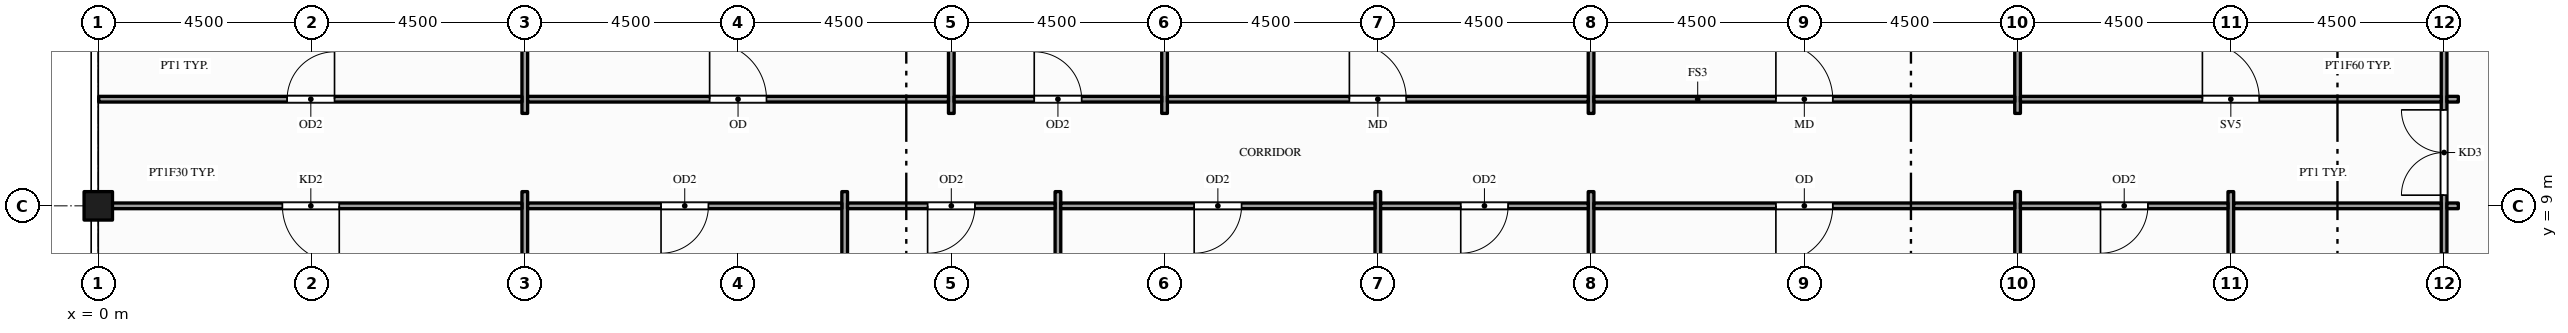
"""IFC4 building model, lengths in metres.
Left out: names, types, materials, properties, quantities, classifications, styles, units other than length and angle.
Written with IfcOpenShell. Run it as: python <this file> out.ifc"""

import sys

from ifc_helpers import new_model, si_unit, direction, frame, frame_2d, origin, origin_2d, place, context, subcontext, project, spatial, rectangle, hollow_rectangle, extrude, element, fill, save


model = new_model("IFC4")
c1 = context("Model", 3, precision=1e-05, world=origin(), true_north=direction((0.0, 1.0)))
c2 = subcontext(c1, "Body", "Model", "MODEL_VIEW")
j1 = project(units=[si_unit("LENGTHUNIT", "METRE"), si_unit("PLANEANGLEUNIT", "RADIAN")], contexts=[c1])
p1 = place(None, origin())
s1 = spatial("IfcSite", under=j1, at=p1, CompositionType="ELEMENT")
p2 = place(p1, origin())
s2 = spatial("IfcBuilding", under=s1, at=p2, CompositionType="ELEMENT")
p3 = place(p2, frame((0.0, 0.0, 332.0)))
s3 = spatial("IfcBuildingStorey", under=s2, at=p3, CompositionType="ELEMENT", Elevation=332.0)
p4 = place(p3, frame((0.0, 9.0, -0.15), z_axis=(0.0, 0.0, 1.0), x_axis=(1.0, 0.0, 0.0)))
e1 = element("IfcColumn", 1, at=p4, inside=s3, PredefinedType="COLUMN", context=c2, shape_type="SweptSolid", body=[
    extrude(hollow_rectangle(XDim=0.6, YDim=0.6, WallThickness=0.03, at=origin_2d()), origin(), (0.0, 0.0, 1.0), 4.5),
])
p5 = place(p3, frame((9.0, 3.875, 0.0), z_axis=(0.0, 0.0, 1.0), x_axis=(0.0, 1.0, 0.0)))
e2 = element("IfcWall", 2, at=p5, inside=s3, PredefinedType="PARTITIONING", context=c2, shape_type="SweptSolid", body=[
    extrude(rectangle(XDim=5.425, YDim=0.12, at=frame_2d((2.712, 0.0))), origin(), (0.0, 0.0, 1.0), 3.359),
])
p6 = place(p3, frame((9.0, 10.95, 0.0), z_axis=(0.0, 0.0, 1.0), x_axis=(0.0, 1.0, 0.0)))
e3 = element("IfcWall", 3, at=p6, inside=s3, PredefinedType="PARTITIONING", context=c2, shape_type="SweptSolid", body=[
    extrude(rectangle(XDim=11.54, YDim=0.12, at=frame_2d((5.77, 0.0))), origin(), (0.0, 0.0, 1.0), 3.359),
])
p7 = place(p3, frame((15.75, 0.01, 0.0), z_axis=(0.0, 0.0, 1.0), x_axis=(0.0, 1.0, 0.0)))
e4 = element("IfcWall", 4, at=p7, inside=s3, PredefinedType="PARTITIONING", context=c2, shape_type="SweptSolid", body=[
    extrude(rectangle(XDim=9.29, YDim=0.12, at=frame_2d((4.645, 0.0))), origin(), (0.0, 0.0, 1.0), 3.359),
])
p8 = place(p3, frame((18.0, 10.95, 0.0), z_axis=(0.0, 0.0, 1.0), x_axis=(0.0, 1.0, 0.0)))
e5 = element("IfcWall", 5, at=p8, inside=s3, PredefinedType="PARTITIONING", context=c2, shape_type="SweptSolid", body=[
    extrude(rectangle(XDim=11.54, YDim=0.12, at=frame_2d((5.77, 0.0))), origin(), (0.0, 0.0, 1.0), 3.359),
])
p9 = place(p3, frame((20.25, 0.01, 0.0), z_axis=(0.0, 0.0, 1.0), x_axis=(0.0, 1.0, 0.0)))
e6 = element("IfcWall", 6, at=p9, inside=s3, PredefinedType="PARTITIONING", context=c2, shape_type="SweptSolid", body=[
    extrude(rectangle(XDim=9.29, YDim=0.12, at=frame_2d((4.645, 0.0))), origin(), (0.0, 0.0, 1.0), 3.359),
])
p10 = place(p3, frame((22.5, 10.95, 0.0), z_axis=(0.0, 0.0, 1.0), x_axis=(0.0, 1.0, 0.0)))
e7 = element("IfcWall", 7, at=p10, inside=s3, PredefinedType="PARTITIONING", context=c2, shape_type="SweptSolid", body=[
    extrude(rectangle(XDim=11.54, YDim=0.12, at=frame_2d((5.77, 0.0))), origin(), (0.0, 0.0, 1.0), 3.359),
])
for number, where, z_axis, x_axis in (
    (8, (27.0, 0.01, 0.0), (0.0, 0.0, 1.0), (0.0, 1.0, 0.0)),
    (9, (31.5, 0.01, 0.0), (0.0, 0.0, 1.0), (0.0, 1.0, 0.0)),
):
    element("IfcWall", number, at=place(p3, frame(where, z_axis=z_axis, x_axis=x_axis)), inside=s3, PredefinedType="PARTITIONING", context=c2, shape_type="SweptSolid", body=[
        extrude(rectangle(XDim=9.29, YDim=0.12, at=frame_2d((4.645, 0.0))), origin(), (0.0, 0.0, 1.0), 3.359),
    ])
p11 = place(p3, frame((31.5, 10.95, 0.0), z_axis=(0.0, 0.0, 1.0), x_axis=(0.0, 1.0, 0.0)))
e10 = element("IfcWall", 10, at=p11, inside=s3, PredefinedType="PARTITIONING", context=c2, shape_type="SweptSolid", body=[
    extrude(rectangle(XDim=11.54, YDim=0.12, at=frame_2d((5.77, 0.0))), origin(), (0.0, 0.0, 1.0), 3.359),
])
p12 = place(p3, frame((40.5, 0.01, 0.0), z_axis=(0.0, 0.0, 1.0), x_axis=(0.0, 1.0, 0.0)))
e11 = element("IfcWall", 11, at=p12, inside=s3, PredefinedType="PARTITIONING", context=c2, shape_type="SweptSolid", body=[
    extrude(rectangle(XDim=9.29, YDim=0.12, at=frame_2d((4.645, 0.0))), origin(), (0.0, 0.0, 1.0), 3.359),
])
p13 = place(p3, frame((40.5, 10.95, 0.0), z_axis=(0.0, 0.0, 1.0), x_axis=(0.0, 1.0, 0.0)))
e12 = element("IfcWall", 12, at=p13, inside=s3, PredefinedType="PARTITIONING", context=c2, shape_type="SweptSolid", body=[
    extrude(rectangle(XDim=11.54, YDim=0.12, at=frame_2d((5.77, 0.0))), origin(), (0.0, 0.0, 1.0), 3.359),
])
p14 = place(p3, frame((45.0, 0.01, 0.0), z_axis=(0.0, 0.0, 1.0), x_axis=(0.0, 1.0, 0.0)))
e13 = element("IfcWall", 13, at=p14, inside=s3, PredefinedType="PARTITIONING", context=c2, shape_type="SweptSolid", body=[
    extrude(rectangle(XDim=9.29, YDim=0.12, at=frame_2d((4.645, 0.0))), origin(), (0.0, 0.0, 1.0), 3.359),
])
p15 = place(p3, frame((49.5, 0.01, 0.0), z_axis=(0.0, 0.0, 1.0), x_axis=(0.0, 1.0, 0.0)))
e14 = element("IfcWall", 14, at=p15, inside=s3, PredefinedType="PARTITIONING", context=c2, shape_type="SweptSolid", body=[
    extrude(rectangle(XDim=22.48, YDim=0.12, at=frame_2d((11.24, 0.0))), origin(), (0.0, 0.0, 1.0), 3.359),
])
p16 = place(p15, frame((9.215, 0.0, 0.0)))
e15 = element("IfcOpeningElement", 15, at=p16, cuts=e14, PredefinedType="OPENING", context=c2, shape_type="SweptSolid", body=[
    extrude(rectangle(XDim=1.8, YDim=2.1, at=frame_2d((0.9, 1.05))), frame((0.0, 0.07, 0.0), z_axis=(0.0, -1.0, 0.0), x_axis=(1.0, 0.0, 0.0)), (0.0, 0.0, 1.0), 0.14),
])
p17 = place(p15, frame((0.99, 0.0, 0.0)))
e16 = element("IfcOpeningElement", 16, at=p17, cuts=e14, PredefinedType="OPENING", context=c2, shape_type="SweptSolid", body=[
    extrude(rectangle(XDim=0.9, YDim=2.1, at=frame_2d((0.45, 1.05))), frame((0.0, 0.07, 0.0), z_axis=(0.0, -1.0, 0.0), x_axis=(1.0, 0.0, 0.0)), (0.0, 0.0, 1.0), 0.14),
])
p18 = place(p15, frame((4.04, 0.0, 0.0)))
e17 = element("IfcOpeningElement", 17, at=p18, cuts=e14, PredefinedType="OPENING", context=c2, shape_type="SweptSolid", body=[
    extrude(rectangle(XDim=0.9, YDim=2.1, at=frame_2d((0.45, 1.05))), frame((0.0, 0.07, 0.0), z_axis=(0.0, -1.0, 0.0), x_axis=(1.0, 0.0, 0.0)), (0.0, 0.0, 1.0), 0.14),
])
p19 = place(p15, frame((6.99, 0.0, 0.0)))
e18 = element("IfcOpeningElement", 18, at=p19, cuts=e14, PredefinedType="OPENING", context=c2, shape_type="SweptSolid", body=[
    extrude(rectangle(XDim=1.0, YDim=2.1, at=frame_2d((0.5, 1.05))), frame((0.0, 0.07, 0.0), z_axis=(0.0, -1.0, 0.0), x_axis=(1.0, 0.0, 0.0)), (0.0, 0.0, 1.0), 0.14),
])
p20 = place(p3, frame((0.01, 9.0, 0.0), z_axis=(0.0, 0.0, 1.0), x_axis=(1.0, 0.0, 0.0)))
e19 = element("IfcWall", 19, at=p20, inside=s3, PredefinedType="PARTITIONING", context=c2, shape_type="SweptSolid", body=[
    extrude(rectangle(XDim=8.93, YDim=0.12, at=frame_2d((4.465, 0.0))), origin(), (0.0, 0.0, 1.0), 3.359),
])
p21 = place(p20, frame((3.875, 0.0, 0.0)))
e20 = element("IfcOpeningElement", 20, at=p21, cuts=e19, PredefinedType="OPENING", context=c2, shape_type="SweptSolid", body=[
    extrude(rectangle(XDim=1.2, YDim=2.1, at=frame_2d((0.6, 1.05))), frame((0.0, 0.07, 0.0), z_axis=(0.0, -1.0, 0.0), x_axis=(1.0, 0.0, 0.0)), (0.0, 0.0, 1.0), 0.14),
])
p22 = place(p3, frame((9.06, 9.0, 0.0), z_axis=(0.0, 0.0, 1.0), x_axis=(1.0, 0.0, 0.0)))
e21 = element("IfcWall", 21, at=p22, inside=s3, PredefinedType="PARTITIONING", context=c2, shape_type="SweptSolid", body=[
    extrude(rectangle(XDim=6.63, YDim=0.12, at=frame_2d((3.315, 0.0))), origin(), (0.0, 0.0, 1.0), 3.359),
])
p23 = place(p22, frame((2.815, 0.0, 0.0)))
e22 = element("IfcOpeningElement", 22, at=p23, cuts=e21, PredefinedType="OPENING", context=c2, shape_type="SweptSolid", body=[
    extrude(rectangle(XDim=1.0, YDim=2.1, at=frame_2d((0.5, 1.05))), frame((0.0, 0.07, 0.0), z_axis=(0.0, -1.0, 0.0), x_axis=(1.0, 0.0, 0.0)), (0.0, 0.0, 1.0), 0.14),
])
p24 = place(p3, frame((15.81, 9.0, 0.0), z_axis=(0.0, 0.0, 1.0), x_axis=(1.0, 0.0, 0.0)))
e23 = element("IfcWall", 23, at=p24, inside=s3, PredefinedType="PARTITIONING", context=c2, shape_type="SweptSolid", body=[
    extrude(rectangle(XDim=4.38, YDim=0.12, at=frame_2d((2.19, 0.0))), origin(), (0.0, 0.0, 1.0), 3.359),
])
p25 = place(p24, frame((1.69, 0.0, 0.0)))
e24 = element("IfcOpeningElement", 24, at=p25, cuts=e23, PredefinedType="OPENING", context=c2, shape_type="SweptSolid", body=[
    extrude(rectangle(XDim=1.0, YDim=2.1, at=frame_2d((0.5, 1.05))), frame((0.0, 0.07, 0.0), z_axis=(0.0, -1.0, 0.0), x_axis=(1.0, 0.0, 0.0)), (0.0, 0.0, 1.0), 0.14),
])
p26 = place(p3, frame((20.31, 9.0, 0.0), z_axis=(0.0, 0.0, 1.0), x_axis=(1.0, 0.0, 0.0)))
e25 = element("IfcWall", 25, at=p26, inside=s3, PredefinedType="PARTITIONING", context=c2, shape_type="SweptSolid", body=[
    extrude(rectangle(XDim=6.63, YDim=0.12, at=frame_2d((3.315, 0.0))), origin(), (0.0, 0.0, 1.0), 3.359),
])
p27 = place(p26, frame((2.815, 0.0, 0.0)))
e26 = element("IfcOpeningElement", 26, at=p27, cuts=e25, PredefinedType="OPENING", context=c2, shape_type="SweptSolid", body=[
    extrude(rectangle(XDim=1.0, YDim=2.1, at=frame_2d((0.5, 1.05))), frame((0.0, 0.07, 0.0), z_axis=(0.0, -1.0, 0.0), x_axis=(1.0, 0.0, 0.0)), (0.0, 0.0, 1.0), 0.14),
])
p28 = place(p3, frame((27.06, 9.0, 0.0), z_axis=(0.0, 0.0, 1.0), x_axis=(1.0, 0.0, 0.0)))
e27 = element("IfcWall", 27, at=p28, inside=s3, PredefinedType="PARTITIONING", context=c2, shape_type="SweptSolid", body=[
    extrude(rectangle(XDim=4.38, YDim=0.12, at=frame_2d((2.19, 0.0))), origin(), (0.0, 0.0, 1.0), 3.359),
])
p29 = place(p28, frame((1.69, 0.0, 0.0)))
e28 = element("IfcOpeningElement", 28, at=p29, cuts=e27, PredefinedType="OPENING", context=c2, shape_type="SweptSolid", body=[
    extrude(rectangle(XDim=1.0, YDim=2.1, at=frame_2d((0.5, 1.05))), frame((0.0, 0.07, 0.0), z_axis=(0.0, -1.0, 0.0), x_axis=(1.0, 0.0, 0.0)), (0.0, 0.0, 1.0), 0.14),
])
p30 = place(p3, frame((31.56, 9.0, 0.0), z_axis=(0.0, 0.0, 1.0), x_axis=(1.0, 0.0, 0.0)))
e29 = element("IfcWall", 29, at=p30, inside=s3, PredefinedType="PARTITIONING", context=c2, shape_type="SweptSolid", body=[
    extrude(rectangle(XDim=8.88, YDim=0.12, at=frame_2d((4.44, 0.0))), origin(), (0.0, 0.0, 1.0), 3.359),
])
p31 = place(p30, frame((3.84, 0.0, 0.0)))
e30 = element("IfcOpeningElement", 30, at=p31, cuts=e29, PredefinedType="OPENING", context=c2, shape_type="SweptSolid", body=[
    extrude(rectangle(XDim=1.2, YDim=2.1, at=frame_2d((0.6, 1.05))), frame((0.0, 0.07, 0.0), z_axis=(0.0, -1.0, 0.0), x_axis=(1.0, 0.0, 0.0)), (0.0, 0.0, 1.0), 0.14),
])
p32 = place(p3, frame((40.56, 9.0, 0.0), z_axis=(0.0, 0.0, 1.0), x_axis=(1.0, 0.0, 0.0)))
e31 = element("IfcWall", 31, at=p32, inside=s3, PredefinedType="PARTITIONING", context=c2, shape_type="SweptSolid", body=[
    extrude(rectangle(XDim=4.38, YDim=0.12, at=frame_2d((2.19, 0.0))), origin(), (0.0, 0.0, 1.0), 3.359),
])
p33 = place(p32, frame((1.69, 0.0, 0.0)))
e32 = element("IfcOpeningElement", 32, at=p33, cuts=e31, PredefinedType="OPENING", context=c2, shape_type="SweptSolid", body=[
    extrude(rectangle(XDim=1.0, YDim=2.1, at=frame_2d((0.5, 1.05))), frame((0.0, 0.07, 0.0), z_axis=(0.0, -1.0, 0.0), x_axis=(1.0, 0.0, 0.0)), (0.0, 0.0, 1.0), 0.14),
])
p34 = place(p3, frame((45.06, 9.0, 0.0), z_axis=(0.0, 0.0, 1.0), x_axis=(1.0, 0.0, 0.0)))
e33 = element("IfcWall", 33, at=p34, inside=s3, PredefinedType="PARTITIONING", context=c2, shape_type="SweptSolid", body=[
    extrude(rectangle(XDim=4.38, YDim=0.12, at=frame_2d((2.19, 0.0))), origin(), (0.0, 0.0, 1.0), 3.359),
])
p35 = place(p3, frame((49.56, 9.0, 0.0), z_axis=(0.0, 0.0, 1.0), x_axis=(1.0, 0.0, 0.0)))
e34 = element("IfcWall", 34, at=p35, inside=s3, PredefinedType="PARTITIONING", context=c2, shape_type="SweptSolid", body=[
    extrude(rectangle(XDim=0.24, YDim=0.12, at=frame_2d((0.12, 0.0))), origin(), (0.0, 0.0, 1.0), 3.359),
])
p36 = place(p3, frame((0.01, 11.25, 0.0), z_axis=(0.0, 0.0, 1.0), x_axis=(1.0, 0.0, 0.0)))
e35 = element("IfcWall", 35, at=p36, inside=s3, PredefinedType="PARTITIONING", context=c2, shape_type="SweptSolid", body=[
    extrude(rectangle(XDim=8.93, YDim=0.12, at=frame_2d((4.465, 0.0))), origin(), (0.0, 0.0, 1.0), 3.359),
])
p37 = place(p36, frame((3.975, 0.0, 0.0)))
e36 = element("IfcOpeningElement", 36, at=p37, cuts=e35, PredefinedType="OPENING", context=c2, shape_type="SweptSolid", body=[
    extrude(rectangle(XDim=1.0, YDim=2.1, at=frame_2d((0.5, 1.05))), frame((0.0, 0.07, 0.0), z_axis=(0.0, -1.0, 0.0), x_axis=(1.0, 0.0, 0.0)), (0.0, 0.0, 1.0), 0.14),
])
p38 = place(p3, frame((9.06, 11.25, 0.0), z_axis=(0.0, 0.0, 1.0), x_axis=(1.0, 0.0, 0.0)))
e37 = element("IfcWall", 37, at=p38, inside=s3, PredefinedType="PARTITIONING", context=c2, shape_type="SweptSolid", body=[
    extrude(rectangle(XDim=8.88, YDim=0.12, at=frame_2d((4.44, 0.0))), origin(), (0.0, 0.0, 1.0), 3.359),
])
p39 = place(p38, frame((3.84, 0.0, 0.0)))
e38 = element("IfcOpeningElement", 38, at=p39, cuts=e37, PredefinedType="OPENING", context=c2, shape_type="SweptSolid", body=[
    extrude(rectangle(XDim=1.2, YDim=2.1, at=frame_2d((0.6, 1.05))), frame((0.0, 0.07, 0.0), z_axis=(0.0, -1.0, 0.0), x_axis=(1.0, 0.0, 0.0)), (0.0, 0.0, 1.0), 0.14),
])
p40 = place(p3, frame((18.06, 11.25, 0.0), z_axis=(0.0, 0.0, 1.0), x_axis=(1.0, 0.0, 0.0)))
e39 = element("IfcWall", 39, at=p40, inside=s3, PredefinedType="PARTITIONING", context=c2, shape_type="SweptSolid", body=[
    extrude(rectangle(XDim=4.38, YDim=0.12, at=frame_2d((2.19, 0.0))), origin(), (0.0, 0.0, 1.0), 3.359),
])
p41 = place(p40, frame((1.69, 0.0, 0.0)))
e40 = element("IfcOpeningElement", 40, at=p41, cuts=e39, PredefinedType="OPENING", context=c2, shape_type="SweptSolid", body=[
    extrude(rectangle(XDim=1.0, YDim=2.1, at=frame_2d((0.5, 1.05))), frame((0.0, 0.07, 0.0), z_axis=(0.0, -1.0, 0.0), x_axis=(1.0, 0.0, 0.0)), (0.0, 0.0, 1.0), 0.14),
])
p42 = place(p3, frame((22.56, 11.25, 0.0), z_axis=(0.0, 0.0, 1.0), x_axis=(1.0, 0.0, 0.0)))
e41 = element("IfcWall", 41, at=p42, inside=s3, PredefinedType="PARTITIONING", context=c2, shape_type="SweptSolid", body=[
    extrude(rectangle(XDim=8.88, YDim=0.12, at=frame_2d((4.44, 0.0))), origin(), (0.0, 0.0, 1.0), 3.359),
])
p43 = place(p42, frame((3.84, 0.0, 0.0)))
e42 = element("IfcOpeningElement", 42, at=p43, cuts=e41, PredefinedType="OPENING", context=c2, shape_type="SweptSolid", body=[
    extrude(rectangle(XDim=1.2, YDim=2.1, at=frame_2d((0.6, 1.05))), frame((0.0, 0.07, 0.0), z_axis=(0.0, -1.0, 0.0), x_axis=(1.0, 0.0, 0.0)), (0.0, 0.0, 1.0), 0.14),
])
p44 = place(p3, frame((31.56, 11.25, 0.0), z_axis=(0.0, 0.0, 1.0), x_axis=(1.0, 0.0, 0.0)))
e43 = element("IfcWall", 43, at=p44, inside=s3, PredefinedType="PARTITIONING", context=c2, shape_type="SweptSolid", body=[
    extrude(rectangle(XDim=8.88, YDim=0.12, at=frame_2d((4.44, 0.0))), origin(), (0.0, 0.0, 1.0), 3.359),
])
p45 = place(p44, frame((3.84, 0.0, 0.0)))
e44 = element("IfcOpeningElement", 44, at=p45, cuts=e43, PredefinedType="OPENING", context=c2, shape_type="SweptSolid", body=[
    extrude(rectangle(XDim=1.2, YDim=2.1, at=frame_2d((0.6, 1.05))), frame((0.0, 0.07, 0.0), z_axis=(0.0, -1.0, 0.0), x_axis=(1.0, 0.0, 0.0)), (0.0, 0.0, 1.0), 0.14),
])
p46 = place(p3, frame((40.56, 11.25, 0.0), z_axis=(0.0, 0.0, 1.0), x_axis=(1.0, 0.0, 0.0)))
e45 = element("IfcWall", 45, at=p46, inside=s3, PredefinedType="PARTITIONING", context=c2, shape_type="SweptSolid", body=[
    extrude(rectangle(XDim=8.88, YDim=0.12, at=frame_2d((4.44, 0.0))), origin(), (0.0, 0.0, 1.0), 3.359),
])
p47 = place(p46, frame((3.84, 0.0, 0.0)))
e46 = element("IfcOpeningElement", 46, at=p47, cuts=e45, PredefinedType="OPENING", context=c2, shape_type="SweptSolid", body=[
    extrude(rectangle(XDim=1.2, YDim=2.1, at=frame_2d((0.6, 1.05))), frame((0.0, 0.07, 0.0), z_axis=(0.0, -1.0, 0.0), x_axis=(1.0, 0.0, 0.0)), (0.0, 0.0, 1.0), 0.14),
])
p48 = place(p3, frame((49.56, 11.25, 0.0), z_axis=(0.0, 0.0, 1.0), x_axis=(1.0, 0.0, 0.0)))
e47 = element("IfcWall", 47, at=p48, inside=s3, PredefinedType="PARTITIONING", context=c2, shape_type="SweptSolid", body=[
    extrude(rectangle(XDim=0.24, YDim=0.12, at=frame_2d((0.12, 0.0))), origin(), (0.0, 0.0, 1.0), 3.359),
])
p49 = place(p16, origin())
e48 = element("IfcDoor", 48, at=p49, inside=s3, OperationType="DOUBLE_DOOR_SINGLE_SWING", PredefinedType="DOOR", context=c2, shape_type="SweptSolid", body=[
    extrude(rectangle(XDim=1.8, YDim=2.1, at=frame_2d((0.9, 1.05))), frame((0.0, 0.025, 0.0), z_axis=(0.0, -1.0, 0.0), x_axis=(1.0, 0.0, 0.0)), (0.0, 0.0, 1.0), 0.05),
])
fill(e15, e48)
p50 = place(p21, origin())
e49 = element("IfcDoor", 49, at=p50, inside=s3, OperationType="SINGLE_SWING_RIGHT", PredefinedType="DOOR", context=c2, shape_type="SweptSolid", body=[
    extrude(rectangle(XDim=1.2, YDim=2.1, at=frame_2d((0.6, 1.05))), frame((0.0, 0.025, 0.0), z_axis=(0.0, -1.0, 0.0), x_axis=(1.0, 0.0, 0.0)), (0.0, 0.0, 1.0), 0.05),
])
fill(e20, e49)
p51 = place(p23, origin())
e50 = element("IfcDoor", 50, at=p51, inside=s3, OperationType="SINGLE_SWING_LEFT", PredefinedType="DOOR", context=c2, shape_type="SweptSolid", body=[
    extrude(rectangle(XDim=1.0, YDim=2.1, at=frame_2d((0.5, 1.05))), frame((0.0, 0.025, 0.0), z_axis=(0.0, -1.0, 0.0), x_axis=(1.0, 0.0, 0.0)), (0.0, 0.0, 1.0), 0.05),
])
fill(e22, e50)
p52 = place(p25, origin())
e51 = element("IfcDoor", 51, at=p52, inside=s3, OperationType="SINGLE_SWING_LEFT", PredefinedType="DOOR", context=c2, shape_type="SweptSolid", body=[
    extrude(rectangle(XDim=1.0, YDim=2.1, at=frame_2d((0.5, 1.05))), frame((0.0, 0.025, 0.0), z_axis=(0.0, -1.0, 0.0), x_axis=(1.0, 0.0, 0.0)), (0.0, 0.0, 1.0), 0.05),
])
fill(e24, e51)
p53 = place(p27, origin())
e52 = element("IfcDoor", 52, at=p53, inside=s3, OperationType="SINGLE_SWING_LEFT", PredefinedType="DOOR", context=c2, shape_type="SweptSolid", body=[
    extrude(rectangle(XDim=1.0, YDim=2.1, at=frame_2d((0.5, 1.05))), frame((0.0, 0.025, 0.0), z_axis=(0.0, -1.0, 0.0), x_axis=(1.0, 0.0, 0.0)), (0.0, 0.0, 1.0), 0.05),
])
fill(e26, e52)
p54 = place(p29, origin())
e53 = element("IfcDoor", 53, at=p54, inside=s3, OperationType="SINGLE_SWING_LEFT", PredefinedType="DOOR", context=c2, shape_type="SweptSolid", body=[
    extrude(rectangle(XDim=1.0, YDim=2.1, at=frame_2d((0.5, 1.05))), frame((0.0, 0.025, 0.0), z_axis=(0.0, -1.0, 0.0), x_axis=(1.0, 0.0, 0.0)), (0.0, 0.0, 1.0), 0.05),
])
fill(e28, e53)
p55 = place(p31, origin())
e54 = element("IfcDoor", 54, at=p55, inside=s3, OperationType="SINGLE_SWING_LEFT", PredefinedType="DOOR", context=c2, shape_type="SweptSolid", body=[
    extrude(rectangle(XDim=1.2, YDim=2.1, at=frame_2d((0.6, 1.05))), frame((0.0, 0.025, 0.0), z_axis=(0.0, -1.0, 0.0), x_axis=(1.0, 0.0, 0.0)), (0.0, 0.0, 1.0), 0.05),
])
fill(e30, e54)
p56 = place(p33, origin())
e55 = element("IfcDoor", 55, at=p56, inside=s3, OperationType="SINGLE_SWING_LEFT", PredefinedType="DOOR", context=c2, shape_type="SweptSolid", body=[
    extrude(rectangle(XDim=1.0, YDim=2.1, at=frame_2d((0.5, 1.05))), frame((0.0, 0.025, 0.0), z_axis=(0.0, -1.0, 0.0), x_axis=(1.0, 0.0, 0.0)), (0.0, 0.0, 1.0), 0.05),
])
fill(e32, e55)
p57 = place(p37, origin())
e56 = element("IfcDoor", 56, at=p57, inside=s3, OperationType="SINGLE_SWING_RIGHT", PredefinedType="DOOR", context=c2, shape_type="SweptSolid", body=[
    extrude(rectangle(XDim=1.0, YDim=2.1, at=frame_2d((0.5, 1.05))), frame((0.0, 0.025, 0.0), z_axis=(0.0, -1.0, 0.0), x_axis=(1.0, 0.0, 0.0)), (0.0, 0.0, 1.0), 0.05),
])
fill(e36, e56)
p58 = place(p39, origin())
e57 = element("IfcDoor", 57, at=p58, inside=s3, OperationType="SINGLE_SWING_LEFT", PredefinedType="DOOR", context=c2, shape_type="SweptSolid", body=[
    extrude(rectangle(XDim=1.2, YDim=2.1, at=frame_2d((0.6, 1.05))), frame((0.0, 0.025, 0.0), z_axis=(0.0, -1.0, 0.0), x_axis=(1.0, 0.0, 0.0)), (0.0, 0.0, 1.0), 0.05),
])
fill(e38, e57)
p59 = place(p41, origin())
e58 = element("IfcDoor", 58, at=p59, inside=s3, OperationType="SINGLE_SWING_LEFT", PredefinedType="DOOR", context=c2, shape_type="SweptSolid", body=[
    extrude(rectangle(XDim=1.0, YDim=2.1, at=frame_2d((0.5, 1.05))), frame((0.0, 0.025, 0.0), z_axis=(0.0, -1.0, 0.0), x_axis=(1.0, 0.0, 0.0)), (0.0, 0.0, 1.0), 0.05),
])
fill(e40, e58)
p60 = place(p43, origin())
e59 = element("IfcDoor", 59, at=p60, inside=s3, OperationType="SINGLE_SWING_LEFT", PredefinedType="DOOR", context=c2, shape_type="SweptSolid", body=[
    extrude(rectangle(XDim=1.2, YDim=2.1, at=frame_2d((0.6, 1.05))), frame((0.0, 0.025, 0.0), z_axis=(0.0, -1.0, 0.0), x_axis=(1.0, 0.0, 0.0)), (0.0, 0.0, 1.0), 0.05),
])
fill(e42, e59)
p61 = place(p45, origin())
e60 = element("IfcDoor", 60, at=p61, inside=s3, OperationType="SINGLE_SWING_LEFT", PredefinedType="DOOR", context=c2, shape_type="SweptSolid", body=[
    extrude(rectangle(XDim=1.2, YDim=2.1, at=frame_2d((0.6, 1.05))), frame((0.0, 0.025, 0.0), z_axis=(0.0, -1.0, 0.0), x_axis=(1.0, 0.0, 0.0)), (0.0, 0.0, 1.0), 0.05),
])
fill(e44, e60)
p62 = place(p47, origin())
e61 = element("IfcDoor", 61, at=p62, inside=s3, OperationType="SINGLE_SWING_LEFT", PredefinedType="DOOR", context=c2, shape_type="SweptSolid", body=[
    extrude(rectangle(XDim=1.2, YDim=2.1, at=frame_2d((0.6, 1.05))), frame((0.0, 0.025, 0.0), z_axis=(0.0, -1.0, 0.0), x_axis=(1.0, 0.0, 0.0)), (0.0, 0.0, 1.0), 0.05),
])
fill(e46, e61)
save(model, sys.argv[1])
